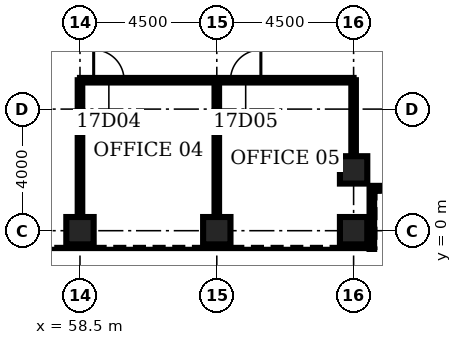
"""IFC4 building model, lengths in metres.
Left out: names, types, materials, properties, quantities, classifications, styles, units other than length and angle.
Written with IfcOpenShell. Run it as: python <this file> out.ifc"""

import sys

from ifc_helpers import new_model, si_unit, direction, frame, frame_2d, origin, origin_2d, place, context, subcontext, project, spatial, rectangle, hollow_rectangle, extrude, element, fill, save


model = new_model("IFC4")
c1 = context("Model", 3, precision=1e-05, world=origin(), true_north=direction((0.0, 1.0)))
c2 = subcontext(c1, "Body", "Model", "MODEL_VIEW")
j1 = project(units=[si_unit("LENGTHUNIT", "METRE"), si_unit("PLANEANGLEUNIT", "RADIAN")], contexts=[c1])
p1 = place(None, origin())
s1 = spatial("IfcSite", under=j1, at=p1, CompositionType="ELEMENT")
p2 = place(p1, origin())
s2 = spatial("IfcBuilding", under=s1, at=p2, CompositionType="ELEMENT")
p3 = place(p2, frame((0.0, 0.0, 81.5)))
s3 = spatial("IfcBuildingStorey", under=s2, at=p3, CompositionType="ELEMENT", Elevation=81.5)
for number, where, z_axis, x_axis in (
    (1, (58.5, 0.0, 0.0), (0.0, 0.0, 1.0), (0.0, 1.0, 0.0)),
    (2, (63.0, 0.0, 0.0), (0.0, 0.0, 1.0), (0.0, 1.0, 0.0)),
    (3, (67.5, 0.0, 0.0), (0.0, 0.0, 1.0), (0.0, 1.0, 0.0)),
    (4, (67.5, 2.0, 0.0), (0.0, 0.0, 1.0), (0.0, 1.0, 0.0)),
):
    element("IfcColumn", number, at=place(p3, frame(where, z_axis=z_axis, x_axis=x_axis)), inside=s3, PredefinedType="COLUMN", context=c2, shape_type="SweptSolid", body=[
        extrude(hollow_rectangle(XDim=0.9, YDim=0.9, WallThickness=0.11, at=origin_2d()), origin(), (0.0, 0.0, 1.0), 4.5),
    ])
p4 = place(p3, frame((58.5, 4.95, 0.0), z_axis=(0.0, 0.0, 1.0), x_axis=(1.0, 0.0, 0.0)))
e5 = element("IfcWall", 5, at=p4, inside=s3, PredefinedType="PARTITIONING", context=c2, shape_type="SweptSolid", body=[
    extrude(rectangle(XDim=9.0, YDim=0.15, at=frame_2d((4.5, 0.0))), origin(), (0.0, 0.0, 1.0), 3.0),
])
p5 = place(p4, frame((0.45, 0.0, 0.0)))
e6 = element("IfcOpeningElement", 6, at=p5, cuts=e5, PredefinedType="OPENING", context=c2, shape_type="SweptSolid", body=[
    extrude(rectangle(XDim=1.0, YDim=2.1, at=frame_2d((0.5, 1.05))), frame((0.0, 0.085, 0.0), z_axis=(0.0, -1.0, 0.0), x_axis=(1.0, 0.0, 0.0)), (0.0, 0.0, 1.0), 0.17),
])
p6 = place(p4, frame((4.95, 0.0, 0.0)))
e7 = element("IfcOpeningElement", 7, at=p6, cuts=e5, PredefinedType="OPENING", context=c2, shape_type="SweptSolid", body=[
    extrude(rectangle(XDim=1.0, YDim=2.1, at=frame_2d((0.5, 1.05))), frame((0.0, 0.085, 0.0), z_axis=(0.0, -1.0, 0.0), x_axis=(1.0, 0.0, 0.0)), (0.0, 0.0, 1.0), 0.17),
])
for number, where, z_axis, x_axis in (
    (8, (58.5, 0.45, 0.0), (0.0, 0.0, 1.0), (0.0, 1.0, 0.0)),
    (9, (63.0, 0.45, 0.0), (0.0, 0.0, 1.0), (0.0, 1.0, 0.0)),
):
    element("IfcWall", number, at=place(p3, frame(where, z_axis=z_axis, x_axis=x_axis)), inside=s3, PredefinedType="PARTITIONING", context=c2, shape_type="SweptSolid", body=[
        extrude(rectangle(XDim=4.5, YDim=0.15, at=frame_2d((2.25, 0.0))), origin(), (0.0, 0.0, 1.0), 3.0),
    ])
p7 = place(p3, frame((67.5, 2.45, 0.0), z_axis=(0.0, 0.0, 1.0), x_axis=(0.0, 1.0, 0.0)))
e10 = element("IfcWall", 10, at=p7, inside=s3, PredefinedType="PARTITIONING", context=c2, shape_type="SweptSolid", body=[
    extrude(rectangle(XDim=2.5, YDim=0.15, at=frame_2d((1.25, 0.0))), origin(), (0.0, 0.0, 1.0), 3.0),
])
p8 = place(p3, frame((68.1, -0.6, 0.0), z_axis=(0.0, 0.0, 1.0), x_axis=(0.0, 1.0, 0.0)))
e11 = element("IfcWall", 11, at=p8, inside=s3, PredefinedType="ELEMENTEDWALL", context=c2, shape_type="SweptSolid", body=[
    extrude(rectangle(XDim=2.0, YDim=0.15, at=frame_2d((1.0, 0.0))), origin(), (0.0, 0.0, 1.0), 4.32),
])
p9 = place(p3, frame((68.1, 1.4, 0.0), z_axis=(0.0, 0.0, 1.0), x_axis=(1.0, 0.0, 0.0)))
e12 = element("IfcWall", 12, at=p9, inside=s3, PredefinedType="ELEMENTEDWALL", context=c2, shape_type="SweptSolid", body=[
    extrude(rectangle(XDim=2.25, YDim=0.15, at=frame_2d((1.125, 0.0))), origin(), (0.0, 0.0, 1.0), 4.32),
])
p10 = place(p5, origin())
e13 = element("IfcDoor", 13, at=p10, inside=s3, OperationType="SINGLE_SWING_LEFT", PredefinedType="DOOR", context=c2, shape_type="SweptSolid", body=[
    extrude(rectangle(XDim=1.0, YDim=2.1, at=frame_2d((0.5, 1.05))), frame((0.0, 0.025, 0.0), z_axis=(0.0, -1.0, 0.0), x_axis=(1.0, 0.0, 0.0)), (0.0, 0.0, 1.0), 0.05),
])
fill(e6, e13)
p11 = place(p6, origin())
e14 = element("IfcDoor", 14, at=p11, inside=s3, OperationType="SINGLE_SWING_RIGHT", PredefinedType="DOOR", context=c2, shape_type="SweptSolid", body=[
    extrude(rectangle(XDim=1.0, YDim=2.1, at=frame_2d((0.5, 1.05))), frame((0.0, 0.025, 0.0), z_axis=(0.0, -1.0, 0.0), x_axis=(1.0, 0.0, 0.0)), (0.0, 0.0, 1.0), 0.05),
])
fill(e7, e14)
save(model, sys.argv[1])
